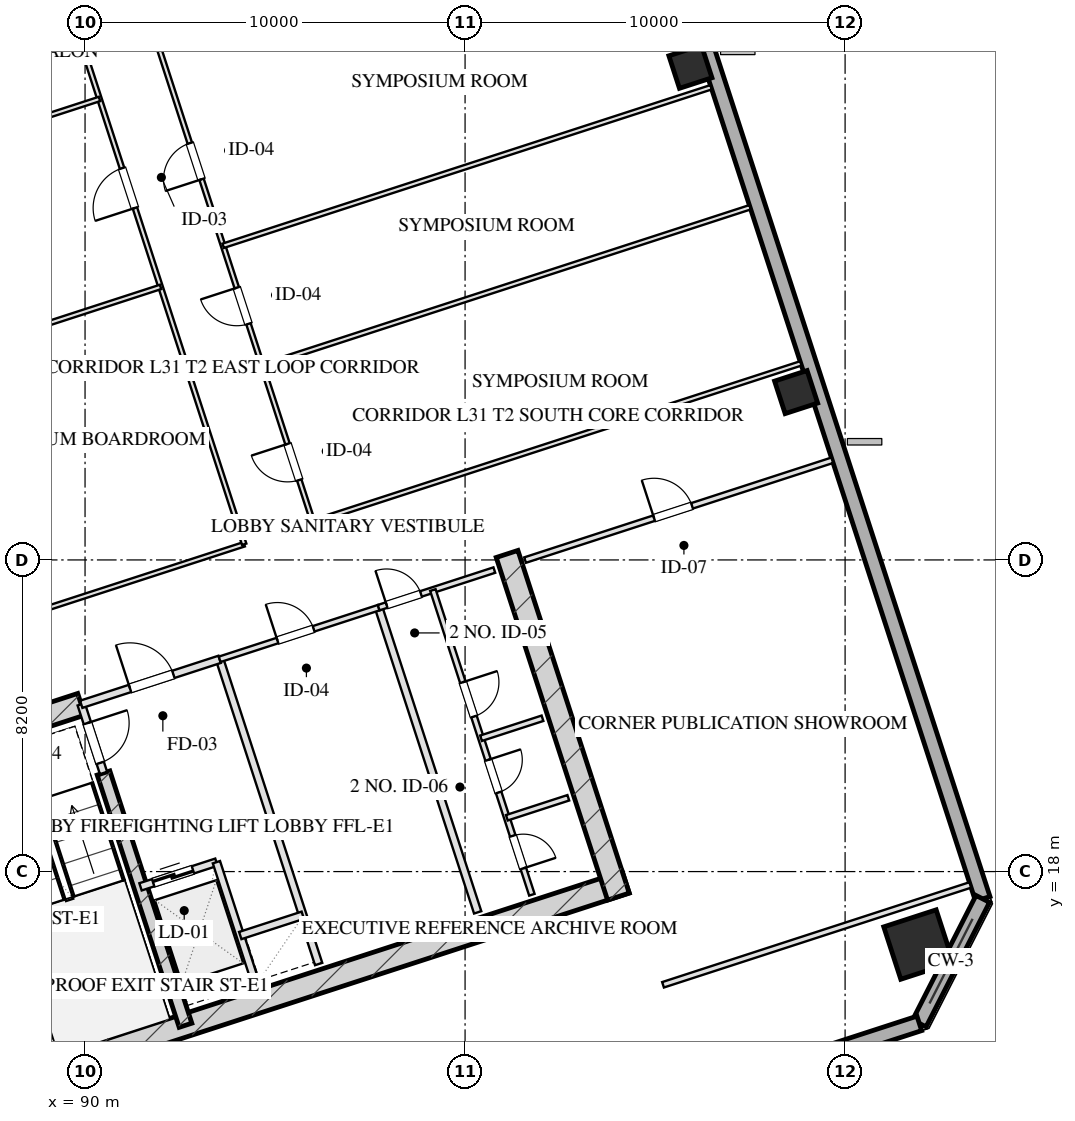
"""IFC4 building model, lengths in metres.
Left out: names, types, materials, properties, quantities, classifications, styles, units other than length and angle.
Written with IfcOpenShell. Run it as: python <this file> out.ifc"""

import sys

from ifc_helpers import new_model, si_unit, direction, frame, frame_2d, origin, origin_2d, place, context, subcontext, project, spatial, rectangle, hollow_rectangle, extrude, element, fill, save


model = new_model("IFC4")
c1 = context("Model", 3, precision=1e-05, world=origin(), true_north=direction((0.0, 1.0)))
c2 = subcontext(c1, "Body", "Model", "MODEL_VIEW")
j1 = project(units=[si_unit("LENGTHUNIT", "METRE"), si_unit("PLANEANGLEUNIT", "RADIAN")], contexts=[c1])
p1 = place(None, origin())
s1 = spatial("IfcSite", under=j1, at=p1, CompositionType="ELEMENT")
p2 = place(p1, origin())
s2 = spatial("IfcBuilding", under=s1, at=p2, CompositionType="ELEMENT")
p3 = place(p2, frame((0.0, 0.0, 120.75)))
s3 = spatial("IfcBuildingStorey", under=s2, at=p3, CompositionType="ELEMENT", Elevation=120.75)
p4 = place(p3, frame((88.63, 12.652, 0.0), z_axis=(0.0, 0.0, 1.0), x_axis=(0.95105714907, 0.309015046886, 0.0)))
e1 = element("IfcWall", 1, at=p4, inside=s3, PredefinedType="SHEAR", context=c2, shape_type="SweptSolid", body=[
    extrude(rectangle(XDim=16.4, YDim=0.6, at=frame_2d((8.2, 0.0))), origin(), (0.0, 0.0, 1.0), 3.45),
])
p5 = place(p3, frame((86.078, 21.475, 0.0), z_axis=(0.0, 0.0, 1.0), x_axis=(0.309017938678, -0.951056209472, 0.0)))
e2 = element("IfcWall", 2, at=p5, inside=s3, PredefinedType="SHEAR", context=c2, shape_type="SweptSolid", body=[
    extrude(rectangle(XDim=9.48, YDim=0.6, at=frame_2d((4.74, 0.0))), origin(), (0.0, 0.0, 1.0), 3.45),
])
p6 = place(p3, frame((101.105, 26.358, 0.0), z_axis=(0.0, 0.0, 1.0), x_axis=(0.309010370028, -0.95105866865, 0.0)))
e3 = element("IfcWall", 3, at=p6, inside=s3, PredefinedType="SHEAR", context=c2, shape_type="SweptSolid", body=[
    extrude(rectangle(XDim=9.48, YDim=0.6, at=frame_2d((4.74, 0.0))), origin(), (0.0, 0.0, 1.0), 3.45),
])
p7 = place(p3, frame((90.486, 20.594, 0.0), z_axis=(0.0, 0.0, 1.0), x_axis=(0.309020428229, -0.951055400562, 0.0)))
e4 = element("IfcWall", 4, at=p7, inside=s3, PredefinedType="SHEAR", context=c2, shape_type="SweptSolid", body=[
    extrude(rectangle(XDim=6.98, YDim=0.35, at=frame_2d((3.49, 0.0))), origin(), (0.0, 0.0, 1.0), 3.45),
])
p8 = place(p3, frame((85.886, 21.097, 0.0), z_axis=(0.0, 0.0, 1.0), x_axis=(0.951068073652, 0.308981422225, 0.0)))
e5 = element("IfcWall", 5, at=p8, inside=s3, PredefinedType="SHEAR", context=c2, shape_type="SweptSolid", body=[
    extrude(rectangle(XDim=4.22, YDim=0.6, at=frame_2d((2.11, 0.0))), origin(), (0.0, 0.0, 1.0), 3.45),
])
p9 = place(p3, frame((111.931, 16.08, 0.0), z_axis=(0.0, 0.0, 1.0), x_axis=(0.951056516295, 0.309016994375, 0.0)))
e6 = element("IfcColumn", 6, at=p9, inside=s3, PredefinedType="COLUMN", context=c2, shape_type="SweptSolid", body=[
    extrude(hollow_rectangle(XDim=1.45, YDim=1.45, WallThickness=0.05, at=origin_2d()), origin(), (0.0, 0.0, 1.0), 3.451),
])
for number, where, z_axis, x_axis in (
    (7, (108.711, 30.616, 0.0), (0.0, 0.0, 1.0), (0.951, 0.309, 0.0)),
    (8, (105.93, 39.176, 0.0), (0.0, 0.0, 1.0), (0.951, 0.309, 0.0)),
):
    element("IfcColumn", number, at=place(p3, frame(where, z_axis=z_axis, x_axis=x_axis)), inside=s3, PredefinedType="COLUMN", context=c2, shape_type="SweptSolid", body=[
        extrude(hollow_rectangle(XDim=0.9, YDim=0.9, WallThickness=0.032, at=origin_2d()), origin(), (0.0, 0.0, 1.0), 3.451),
    ])
p10 = place(p3, frame((99.284, 61.41, 0.0), z_axis=(0.0, 0.0, 1.0), x_axis=(0.309017542002, -0.95105633836, 0.0)))
e9 = element("IfcWall", 9, at=p10, inside=s3, PredefinedType="SOLIDWALL", context=c2, shape_type="SweptSolid", body=[
    extrude(rectangle(XDim=46.4, YDim=0.4, at=frame_2d((23.2, 0.0))), origin(), (0.0, 0.0, 1.0), 2.61),
])
p11 = place(p10, frame((20.05, 0.0, 0.0)))
e10 = element("IfcOpeningElement", 10, at=p11, cuts=e9, PredefinedType="OPENING", context=c2, shape_type="SweptSolid", body=[
    extrude(rectangle(XDim=1.1, YDim=2.15, at=frame_2d((0.55, 1.075))), frame((0.0, 0.21, 0.0), z_axis=(0.0, -1.0, 0.0), x_axis=(1.0, 0.0, 0.0)), (0.0, 0.0, 1.0), 0.42),
])
p12 = place(p3, frame((113.623, 17.281, 0.0), z_axis=(0.0, 0.0, 1.0), x_axis=(-0.454026238093, -0.890988313685, 0.0)))
e11 = element("IfcWall", 11, at=p12, inside=s3, PredefinedType="SOLIDWALL", context=c2, shape_type="SweptSolid", body=[
    extrude(rectangle(XDim=3.677, YDim=0.4, at=frame_2d((1.838, 0.0))), origin(), (0.0, 0.0, 1.0), 2.61),
])
p13 = place(p3, frame((111.953, 14.005, 0.0), z_axis=(0.0, 0.0, 1.0), x_axis=(-0.95105505922, -0.309021478754, 0.0)))
e12 = element("IfcWall", 12, at=p13, inside=s3, PredefinedType="SOLIDWALL", context=c2, shape_type="SweptSolid", body=[
    extrude(rectangle(XDim=29.4, YDim=0.4, at=frame_2d((14.7, 0.0))), origin(), (0.0, 0.0, 1.0), 2.61),
])
p14 = place(p3, frame((89.899, 22.401, 0.0), z_axis=(0.0, 0.0, 1.0), x_axis=(0.308932062672, -0.951084108086, 0.0)))
e13 = element("IfcWall", 13, at=p14, inside=s3, PredefinedType="PARTITIONING", context=c2, shape_type="SweptSolid", body=[
    extrude(rectangle(XDim=1.9, YDim=0.2, at=frame_2d((0.95, 0.0))), origin(), (0.0, 0.0, 1.0), 3.175),
])
p15 = place(p14, frame((0.52, 0.0, 0.0)))
e14 = element("IfcOpeningElement", 14, at=p15, cuts=e13, PredefinedType="OPENING", context=c2, shape_type="SweptSolid", body=[
    extrude(rectangle(XDim=1.1, YDim=2.05, at=frame_2d((0.55, 1.025))), frame((0.0, 0.11, 0.0), z_axis=(0.0, -1.0, 0.0), x_axis=(1.0, 0.0, 0.0)), (0.0, 0.0, 1.0), 0.22),
])
p16 = place(p3, frame((93.542, 23.585, 0.0), z_axis=(0.0, 0.0, 1.0), x_axis=(0.309042196757, -0.951048327176, 0.0)))
e15 = element("IfcWall", 15, at=p16, inside=s3, PredefinedType="PARTITIONING", context=c2, shape_type="SweptSolid", body=[
    extrude(rectangle(XDim=8.43, YDim=0.2, at=frame_2d((4.215, 0.0))), origin(), (0.0, 0.0, 1.0), 3.175),
])
p17 = place(p3, frame((89.899, 22.401, 0.0), z_axis=(0.0, 0.0, 1.0), x_axis=(0.951046716504, 0.309047153403, 0.0)))
e16 = element("IfcWall", 16, at=p17, inside=s3, PredefinedType="PARTITIONING", context=c2, shape_type="SweptSolid", body=[
    extrude(rectangle(XDim=3.83, YDim=0.2, at=frame_2d((1.915, 0.0))), origin(), (0.0, 0.0, 1.0), 3.175),
])
p18 = place(p17, frame((1.35, 0.0, 0.0)))
e17 = element("IfcOpeningElement", 17, at=p18, cuts=e16, PredefinedType="OPENING", context=c2, shape_type="SweptSolid", body=[
    extrude(rectangle(XDim=1.2, YDim=2.05, at=frame_2d((0.6, 1.025))), frame((0.0, 0.11, 0.0), z_axis=(0.0, -1.0, 0.0), x_axis=(1.0, 0.0, 0.0)), (0.0, 0.0, 1.0), 0.22),
])
p19 = place(p3, frame((91.46, 17.598, 0.0), z_axis=(0.0, 0.0, 1.0), x_axis=(0.951062257173, 0.308999325213, 0.0)))
e18 = element("IfcWall", 18, at=p19, inside=s3, PredefinedType="PARTITIONING", context=c2, shape_type="SweptSolid", body=[
    extrude(rectangle(XDim=2.1, YDim=0.2, at=frame_2d((1.05, 0.0))), origin(), (0.0, 0.0, 1.0), 3.175),
])
p20 = place(p19, frame((0.35, 0.0, 0.0)))
e19 = element("IfcOpeningElement", 19, at=p20, cuts=e18, PredefinedType="OPENING", context=c2, shape_type="SweptSolid", body=[
    extrude(rectangle(XDim=1.1, YDim=2.05, at=frame_2d((0.55, 1.025))), frame((0.0, 0.11, 0.0), z_axis=(0.0, -1.0, 0.0), x_axis=(1.0, 0.0, 0.0)), (0.0, 0.0, 1.0), 0.22),
])
p21 = place(p3, frame((93.457, 18.247, 0.0), z_axis=(0.0, 0.0, 1.0), x_axis=(0.3089935693, -0.951064127245, 0.0)))
e20 = element("IfcWall", 20, at=p21, inside=s3, PredefinedType="PARTITIONING", context=c2, shape_type="SweptSolid", body=[
    extrude(rectangle(XDim=3.7, YDim=0.2, at=frame_2d((1.85, 0.0))), origin(), (0.0, 0.0, 1.0), 3.175),
])
p22 = place(p3, frame((94.084, 16.317, 0.0), z_axis=(0.0, 0.0, 1.0), x_axis=(0.951041328149, 0.309063734775, 0.0)))
e21 = element("IfcWall", 21, at=p22, inside=s3, PredefinedType="PARTITIONING", context=c2, shape_type="SweptSolid", body=[
    extrude(rectangle(XDim=1.73, YDim=0.2, at=frame_2d((0.865, 0.0))), origin(), (0.0, 0.0, 1.0), 3.175),
])
p23 = place(p3, frame((97.727, 24.944, 0.0), z_axis=(0.0, 0.0, 1.0), x_axis=(0.309016001439, -0.951056838919, 0.0)))
e22 = element("IfcWall", 22, at=p23, inside=s3, PredefinedType="PARTITIONING", context=c2, shape_type="SweptSolid", body=[
    extrude(rectangle(XDim=8.43, YDim=0.2, at=frame_2d((4.215, 0.0))), origin(), (0.0, 0.0, 1.0), 3.175),
])
p24 = place(p3, frame((93.542, 23.585, 0.0), z_axis=(0.0, 0.0, 1.0), x_axis=(0.951063829732, 0.308994485023, 0.0)))
e23 = element("IfcWall", 23, at=p24, inside=s3, PredefinedType="PARTITIONING", context=c2, shape_type="SweptSolid", body=[
    extrude(rectangle(XDim=4.4, YDim=0.15, at=frame_2d((2.2, 0.0))), origin(), (0.0, 0.0, 1.0), 3.175),
])
p25 = place(p24, frame((1.6, 0.0, 0.0)))
e24 = element("IfcOpeningElement", 24, at=p25, cuts=e23, PredefinedType="OPENING", context=c2, shape_type="SweptSolid", body=[
    extrude(rectangle(XDim=1.0, YDim=2.05, at=frame_2d((0.5, 1.025))), frame((0.0, 0.085, 0.0), z_axis=(0.0, -1.0, 0.0), x_axis=(1.0, 0.0, 0.0)), (0.0, 0.0, 1.0), 0.17),
])
p26 = place(p3, frame((97.727, 24.944, 0.0), z_axis=(0.0, 0.0, 1.0), x_axis=(0.951036872128, 0.309077446369, 0.0)))
e25 = element("IfcWall", 25, at=p26, inside=s3, PredefinedType="PARTITIONING", context=c2, shape_type="SweptSolid", body=[
    extrude(rectangle(XDim=3.2, YDim=0.15, at=frame_2d((1.6, 0.0))), origin(), (0.0, 0.0, 1.0), 3.175),
])
p27 = place(p26, frame((0.22, 0.0, 0.0)))
e26 = element("IfcOpeningElement", 26, at=p27, cuts=e25, PredefinedType="OPENING", context=c2, shape_type="SweptSolid", body=[
    extrude(rectangle(XDim=0.95, YDim=2.05, at=frame_2d((0.475, 1.025))), frame((0.0, 0.085, 0.0), z_axis=(0.0, -1.0, 0.0), x_axis=(1.0, 0.0, 0.0)), (0.0, 0.0, 1.0), 0.17),
])
p28 = place(p3, frame((99.153, 25.408, 0.0), z_axis=(0.0, 0.0, 1.0), x_axis=(0.309016001439, -0.951056838919, 0.0)))
e27 = element("IfcWall", 27, at=p28, inside=s3, PredefinedType="PARTITIONING", context=c2, shape_type="SweptSolid", body=[
    extrude(rectangle(XDim=8.43, YDim=0.15, at=frame_2d((4.215, 0.0))), origin(), (0.0, 0.0, 1.0), 3.175),
])
p29 = place(p28, frame((2.55, 0.0, 0.0)))
e28 = element("IfcOpeningElement", 28, at=p29, cuts=e27, PredefinedType="OPENING", context=c2, shape_type="SweptSolid", body=[
    extrude(rectangle(XDim=0.95, YDim=2.05, at=frame_2d((0.475, 1.025))), frame((0.0, 0.085, 0.0), z_axis=(0.0, -1.0, 0.0), x_axis=(1.0, 0.0, 0.0)), (0.0, 0.0, 1.0), 0.17),
])
p30 = place(p28, frame((4.7, 0.0, 0.0)))
e29 = element("IfcOpeningElement", 29, at=p30, cuts=e27, PredefinedType="OPENING", context=c2, shape_type="SweptSolid", body=[
    extrude(rectangle(XDim=0.9, YDim=2.05, at=frame_2d((0.45, 1.025))), frame((0.0, 0.085, 0.0), z_axis=(0.0, -1.0, 0.0), x_axis=(1.0, 0.0, 0.0)), (0.0, 0.0, 1.0), 0.17),
])
p31 = place(p28, frame((6.8, 0.0, 0.0)))
e30 = element("IfcOpeningElement", 30, at=p31, cuts=e27, PredefinedType="OPENING", context=c2, shape_type="SweptSolid", body=[
    extrude(rectangle(XDim=0.9, YDim=2.05, at=frame_2d((0.45, 1.025))), frame((0.0, 0.085, 0.0), z_axis=(0.0, -1.0, 0.0), x_axis=(1.0, 0.0, 0.0)), (0.0, 0.0, 1.0), 0.17),
])
p32 = place(p3, frame((100.42, 21.509, 0.0), z_axis=(0.0, 0.0, 1.0), x_axis=(0.951040401051, 0.309066587596, 0.0)))
e31 = element("IfcWall", 31, at=p32, inside=s3, PredefinedType="PARTITIONING", context=c2, shape_type="SweptSolid", body=[
    extrude(rectangle(XDim=1.7, YDim=0.15, at=frame_2d((0.85, 0.0))), origin(), (0.0, 0.0, 1.0), 3.175),
])
p33 = place(p3, frame((101.1, 19.416, 0.0), z_axis=(0.0, 0.0, 1.0), x_axis=(0.951054116971, 0.309024378638, 0.0)))
e32 = element("IfcWall", 32, at=p33, inside=s3, PredefinedType="PARTITIONING", context=c2, shape_type="SweptSolid", body=[
    extrude(rectangle(XDim=1.7, YDim=0.15, at=frame_2d((0.85, 0.0))), origin(), (0.0, 0.0, 1.0), 3.175),
])
p34 = place(p3, frame((105.209, 15.021, 0.0), z_axis=(0.0, 0.0, 1.0), x_axis=(0.951054329824, 0.309023723562, 0.0)))
e33 = element("IfcWall", 33, at=p34, inside=s3, PredefinedType="PARTITIONING", context=c2, shape_type="SweptSolid", body=[
    extrude(rectangle(XDim=8.5, YDim=0.15, at=frame_2d((4.25, 0.0))), origin(), (0.0, 0.0, 1.0), 3.175),
])
p35 = place(p3, frame((101.578, 26.196, 0.0), z_axis=(0.0, 0.0, 1.0), x_axis=(0.951062770994, 0.308997743729, 0.0)))
e34 = element("IfcWall", 34, at=p35, inside=s3, PredefinedType="PARTITIONING", context=c2, shape_type="SweptSolid", body=[
    extrude(rectangle(XDim=8.5, YDim=0.15, at=frame_2d((4.25, 0.0))), origin(), (0.0, 0.0, 1.0), 3.175),
])
p36 = place(p35, frame((3.57, 0.0, 0.0)))
e35 = element("IfcOpeningElement", 35, at=p36, cuts=e34, PredefinedType="OPENING", context=c2, shape_type="SweptSolid", body=[
    extrude(rectangle(XDim=1.05, YDim=2.05, at=frame_2d((0.525, 1.025))), frame((0.0, 0.085, 0.0), z_axis=(0.0, -1.0, 0.0), x_axis=(1.0, 0.0, 0.0)), (0.0, 0.0, 1.0), 0.17),
])
p37 = place(p3, frame((86.675, 24.171, 0.0), z_axis=(0.0, 0.0, 1.0), x_axis=(0.951057231385, 0.309014793547, 0.0)))
e36 = element("IfcWall", 36, at=p37, inside=s3, PredefinedType="PARTITIONING", context=c2, shape_type="SweptSolid", body=[
    extrude(rectangle(XDim=7.9, YDim=0.12, at=frame_2d((3.95, 0.0))), origin(), (0.0, 0.0, 1.0), 3.175),
])
p38 = place(p3, frame((95.995, 27.2, 0.0), z_axis=(0.0, 0.0, 1.0), x_axis=(0.951057589409, 0.309013691651, 0.0)))
e37 = element("IfcWall", 37, at=p38, inside=s3, PredefinedType="PARTITIONING", context=c2, shape_type="SweptSolid", body=[
    extrude(rectangle(XDim=13.5, YDim=0.12, at=frame_2d((6.75, 0.0))), origin(), (0.0, 0.0, 1.0), 3.175),
])
p39 = place(p3, frame((94.188, 26.613, 0.0), z_axis=(0.0, 0.0, 1.0), x_axis=(-0.30901773025, 0.951056277195, 0.0)))
e38 = element("IfcWall", 38, at=p39, inside=s3, PredefinedType="PARTITIONING", context=c2, shape_type="SweptSolid", body=[
    extrude(rectangle(XDim=16.64, YDim=0.12, at=frame_2d((8.32, 0.0))), origin(), (0.0, 0.0, 1.0), 3.175),
])
p40 = place(p39, frame((9.304, 0.0, 0.0)))
e39 = element("IfcOpeningElement", 39, at=p40, cuts=e38, PredefinedType="OPENING", context=c2, shape_type="SweptSolid", body=[
    extrude(rectangle(XDim=1.1, YDim=2.05, at=frame_2d((0.55, 1.025))), frame((0.0, 0.07, 0.0), z_axis=(0.0, -1.0, 0.0), x_axis=(1.0, 0.0, 0.0)), (0.0, 0.0, 1.0), 0.14),
])
p41 = place(p3, frame((95.995, 27.2, 0.0), z_axis=(0.0, 0.0, 1.0), x_axis=(-0.309022042254, 0.951054876125, 0.0)))
e40 = element("IfcWall", 40, at=p41, inside=s3, PredefinedType="PARTITIONING", context=c2, shape_type="SweptSolid", body=[
    extrude(rectangle(XDim=16.64, YDim=0.12, at=frame_2d((8.32, 0.0))), origin(), (0.0, 0.0, 1.0), 3.175),
])
p42 = place(p41, frame((1.16, 0.0, 0.0)))
e41 = element("IfcOpeningElement", 41, at=p42, cuts=e40, PredefinedType="OPENING", context=c2, shape_type="SweptSolid", body=[
    extrude(rectangle(XDim=1.0, YDim=2.05, at=frame_2d((0.5, 1.025))), frame((0.0, 0.07, 0.0), z_axis=(0.0, -1.0, 0.0), x_axis=(1.0, 0.0, 0.0)), (0.0, 0.0, 1.0), 0.14),
])
p43 = place(p41, frame((5.48, 0.0, 0.0)))
e42 = element("IfcOpeningElement", 42, at=p43, cuts=e40, PredefinedType="OPENING", context=c2, shape_type="SweptSolid", body=[
    extrude(rectangle(XDim=1.0, YDim=2.05, at=frame_2d((0.5, 1.025))), frame((0.0, 0.07, 0.0), z_axis=(0.0, -1.0, 0.0), x_axis=(1.0, 0.0, 0.0)), (0.0, 0.0, 1.0), 0.14),
])
p44 = place(p41, frame((9.48, 0.0, 0.0)))
e43 = element("IfcOpeningElement", 43, at=p44, cuts=e40, PredefinedType="OPENING", context=c2, shape_type="SweptSolid", body=[
    extrude(rectangle(XDim=1.0, YDim=2.05, at=frame_2d((0.5, 1.025))), frame((0.0, 0.07, 0.0), z_axis=(0.0, -1.0, 0.0), x_axis=(1.0, 0.0, 0.0)), (0.0, 0.0, 1.0), 0.14),
])
p45 = place(p41, frame((14.48, 0.0, 0.0)))
e44 = element("IfcOpeningElement", 44, at=p45, cuts=e40, PredefinedType="OPENING", context=c2, shape_type="SweptSolid", body=[
    extrude(rectangle(XDim=1.0, YDim=2.05, at=frame_2d((0.5, 1.025))), frame((0.0, 0.07, 0.0), z_axis=(0.0, -1.0, 0.0), x_axis=(1.0, 0.0, 0.0)), (0.0, 0.0, 1.0), 0.14),
])
for number, where, z_axis, x_axis in (
    (45, (84.474, 30.943, 0.0), (0.0, 0.0, 1.0), (0.951, 0.309, 0.0)),
    (46, (82.867, 35.888, 0.0), (0.0, 0.0, 1.0), (0.951, 0.309, 0.0)),
):
    element("IfcWall", number, at=place(p3, frame(where, z_axis=z_axis, x_axis=x_axis)), inside=s3, PredefinedType="PARTITIONING", context=c2, shape_type="SweptSolid", body=[
        extrude(rectangle(XDim=7.9, YDim=0.12, at=frame_2d((3.95, 0.0))), origin(), (0.0, 0.0, 1.0), 3.175),
    ])
for number, where, z_axis, x_axis in (
    (47, (94.66, 31.308, 0.0), (0.0, 0.0, 1.0), (0.951, 0.309, 0.0)),
    (48, (93.634, 34.466, 0.0), (0.0, 0.0, 1.0), (0.951, 0.309, 0.0)),
):
    element("IfcWall", number, at=place(p3, frame(where, z_axis=z_axis, x_axis=x_axis)), inside=s3, PredefinedType="PARTITIONING", context=c2, shape_type="SweptSolid", body=[
        extrude(rectangle(XDim=13.5, YDim=0.12, at=frame_2d((6.75, 0.0))), origin(), (0.0, 0.0, 1.0), 3.175),
    ])
p46 = place(p15, origin())
e49 = element("IfcDoor", 49, at=p46, inside=s3, OperationType="SINGLE_SWING_LEFT", PredefinedType="DOOR", context=c2, shape_type="SweptSolid", body=[
    extrude(rectangle(XDim=1.1, YDim=2.05, at=frame_2d((0.55, 1.025))), frame((0.0, 0.025, 0.0), z_axis=(0.0, -1.0, 0.0), x_axis=(1.0, 0.0, 0.0)), (0.0, 0.0, 1.0), 0.05),
])
fill(e14, e49)
p47 = place(p18, origin())
e50 = element("IfcDoor", 50, at=p47, inside=s3, OperationType="SINGLE_SWING_LEFT", PredefinedType="DOOR", context=c2, shape_type="SweptSolid", body=[
    extrude(rectangle(XDim=1.2, YDim=2.05, at=frame_2d((0.6, 1.025))), frame((0.0, 0.025, 0.0), z_axis=(0.0, -1.0, 0.0), x_axis=(1.0, 0.0, 0.0)), (0.0, 0.0, 1.0), 0.05),
])
fill(e17, e50)
p48 = place(p20, origin())
e51 = element("IfcDoor", 51, at=p48, inside=s3, OperationType="DOUBLE_DOOR_SLIDING", PredefinedType="DOOR", context=c2, shape_type="SweptSolid", body=[
    extrude(rectangle(XDim=1.1, YDim=2.05, at=frame_2d((0.55, 1.025))), frame((0.0, 0.025, 0.0), z_axis=(0.0, -1.0, 0.0), x_axis=(1.0, 0.0, 0.0)), (0.0, 0.0, 1.0), 0.05),
])
fill(e19, e51)
p49 = place(p25, origin())
e52 = element("IfcDoor", 52, at=p49, inside=s3, OperationType="SINGLE_SWING_LEFT", PredefinedType="DOOR", context=c2, shape_type="SweptSolid", body=[
    extrude(rectangle(XDim=1.0, YDim=2.05, at=frame_2d((0.5, 1.025))), frame((0.0, 0.025, 0.0), z_axis=(0.0, -1.0, 0.0), x_axis=(1.0, 0.0, 0.0)), (0.0, 0.0, 1.0), 0.05),
])
fill(e24, e52)
p50 = place(p27, origin())
e53 = element("IfcDoor", 53, at=p50, inside=s3, OperationType="SINGLE_SWING_LEFT", PredefinedType="DOOR", context=c2, shape_type="SweptSolid", body=[
    extrude(rectangle(XDim=0.95, YDim=2.05, at=frame_2d((0.475, 1.025))), frame((0.0, 0.025, 0.0), z_axis=(0.0, -1.0, 0.0), x_axis=(1.0, 0.0, 0.0)), (0.0, 0.0, 1.0), 0.05),
])
fill(e26, e53)
p51 = place(p29, origin())
e54 = element("IfcDoor", 54, at=p51, inside=s3, OperationType="SINGLE_SWING_LEFT", PredefinedType="DOOR", context=c2, shape_type="SweptSolid", body=[
    extrude(rectangle(XDim=0.95, YDim=2.05, at=frame_2d((0.475, 1.025))), frame((0.0, 0.025, 0.0), z_axis=(0.0, -1.0, 0.0), x_axis=(1.0, 0.0, 0.0)), (0.0, 0.0, 1.0), 0.05),
])
fill(e28, e54)
p52 = place(p30, origin())
e55 = element("IfcDoor", 55, at=p52, inside=s3, OperationType="SINGLE_SWING_LEFT", PredefinedType="DOOR", context=c2, shape_type="SweptSolid", body=[
    extrude(rectangle(XDim=0.9, YDim=2.05, at=frame_2d((0.45, 1.025))), frame((0.0, 0.025, 0.0), z_axis=(0.0, -1.0, 0.0), x_axis=(1.0, 0.0, 0.0)), (0.0, 0.0, 1.0), 0.05),
])
fill(e29, e55)
p53 = place(p31, origin())
e56 = element("IfcDoor", 56, at=p53, inside=s3, OperationType="SINGLE_SWING_RIGHT", PredefinedType="DOOR", context=c2, shape_type="SweptSolid", body=[
    extrude(rectangle(XDim=0.9, YDim=2.05, at=frame_2d((0.45, 1.025))), frame((0.0, 0.025, 0.0), z_axis=(0.0, -1.0, 0.0), x_axis=(1.0, 0.0, 0.0)), (0.0, 0.0, 1.0), 0.05),
])
fill(e30, e56)
p54 = place(p36, origin())
e57 = element("IfcDoor", 57, at=p54, inside=s3, OperationType="SINGLE_SWING_LEFT", PredefinedType="DOOR", context=c2, shape_type="SweptSolid", body=[
    extrude(rectangle(XDim=1.05, YDim=2.05, at=frame_2d((0.525, 1.025))), frame((0.0, 0.025, 0.0), z_axis=(0.0, -1.0, 0.0), x_axis=(1.0, 0.0, 0.0)), (0.0, 0.0, 1.0), 0.05),
])
fill(e35, e57)
p55 = place(p40, origin())
e58 = element("IfcDoor", 58, at=p55, inside=s3, OperationType="SINGLE_SWING_LEFT", PredefinedType="DOOR", context=c2, shape_type="SweptSolid", body=[
    extrude(rectangle(XDim=1.1, YDim=2.05, at=frame_2d((0.55, 1.025))), frame((0.0, 0.025, 0.0), z_axis=(0.0, -1.0, 0.0), x_axis=(1.0, 0.0, 0.0)), (0.0, 0.0, 1.0), 0.05),
])
fill(e39, e58)
p56 = place(p42, origin())
e59 = element("IfcDoor", 59, at=p56, inside=s3, OperationType="SINGLE_SWING_RIGHT", PredefinedType="DOOR", context=c2, shape_type="SweptSolid", body=[
    extrude(rectangle(XDim=1.0, YDim=2.05, at=frame_2d((0.5, 1.025))), frame((0.0, 0.025, 0.0), z_axis=(0.0, -1.0, 0.0), x_axis=(1.0, 0.0, 0.0)), (0.0, 0.0, 1.0), 0.05),
])
fill(e41, e59)
p57 = place(p43, origin())
e60 = element("IfcDoor", 60, at=p57, inside=s3, OperationType="SINGLE_SWING_RIGHT", PredefinedType="DOOR", context=c2, shape_type="SweptSolid", body=[
    extrude(rectangle(XDim=1.0, YDim=2.05, at=frame_2d((0.5, 1.025))), frame((0.0, 0.025, 0.0), z_axis=(0.0, -1.0, 0.0), x_axis=(1.0, 0.0, 0.0)), (0.0, 0.0, 1.0), 0.05),
])
fill(e42, e60)
p58 = place(p44, origin())
e61 = element("IfcDoor", 61, at=p58, inside=s3, OperationType="SINGLE_SWING_LEFT", PredefinedType="DOOR", context=c2, shape_type="SweptSolid", body=[
    extrude(rectangle(XDim=1.0, YDim=2.05, at=frame_2d((0.5, 1.025))), frame((0.0, 0.025, 0.0), z_axis=(0.0, -1.0, 0.0), x_axis=(1.0, 0.0, 0.0)), (0.0, 0.0, 1.0), 0.05),
])
fill(e43, e61)
save(model, sys.argv[1])
